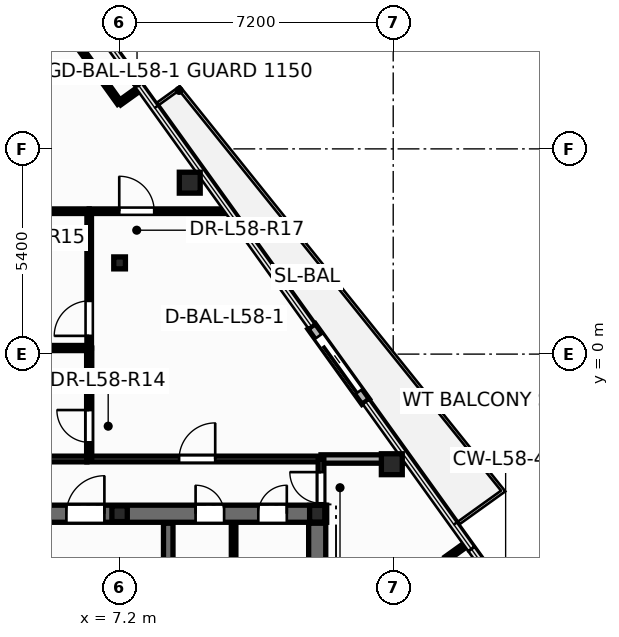
"""IFC4 building model, lengths in metres.
Left out: names, types, materials, properties, quantities, classifications, styles, units other than length and angle.
Written with IfcOpenShell. Run it as: python <this file> out.ifc"""

import sys

from ifc_helpers import new_model, si_unit, direction, frame, frame_2d, origin, origin_2d, place, context, subcontext, project, spatial, rectangle, hollow_circle, i_section, extrude, element, fill, save


model = new_model("IFC4")
c1 = context("Model", 3, precision=1e-05, world=origin(), true_north=direction((0.0, 1.0)))
c2 = subcontext(c1, "Body", "Model", "MODEL_VIEW")
j1 = project(units=[si_unit("LENGTHUNIT", "METRE"), si_unit("PLANEANGLEUNIT", "RADIAN")], contexts=[c1])
p1 = place(None, origin())
s1 = spatial("IfcSite", under=j1, at=p1, CompositionType="ELEMENT")
p2 = place(p1, origin())
s2 = spatial("IfcBuilding", under=s1, at=p2, CompositionType="ELEMENT")
p3 = place(p2, frame((0.0, 0.0, 221.7)))
s3 = spatial("IfcBuildingStorey", under=s2, at=p3, CompositionType="ELEMENT", Elevation=221.7)
for number, where, z_axis, x_axis in (
    (1, (14.363, -2.897, 0.0), (0.0, 0.0, 1.0), (1.0, 0.0, 0.0)),
    (2, (9.046, 4.51, 0.0), (0.0, 0.0, 1.0), (1.0, 0.0, 0.0)),
):
    element("IfcColumn", number, at=place(p3, frame(where, z_axis=z_axis, x_axis=x_axis)), inside=s3, PredefinedType="COLUMN", context=c2, shape_type="SweptSolid", body=[
        extrude(hollow_circle(Radius=0.275, WallThickness=0.024, at=origin_2d()), origin(), (0.0, 0.0, 1.0), 3.6),
    ])
p4 = place(p3, frame((12.4, -4.2, 0.0), z_axis=(0.0, 0.0, 1.0), x_axis=(1.0, 0.0, 0.0)))
e3 = element("IfcColumn", 3, at=p4, inside=s3, PredefinedType="COLUMN", context=c2, shape_type="SweptSolid", body=[
    extrude(i_section(OverallWidth=0.4, OverallDepth=0.44, WebThickness=0.028, FlangeThickness=0.04, at=origin_2d()), origin(), (0.0, 0.0, 1.0), 3.6),
])
p5 = place(p3, frame((7.2, -4.2, 0.0), z_axis=(0.0, 0.0, 1.0), x_axis=(1.0, 0.0, 0.0)))
e4 = element("IfcColumn", 4, at=p5, inside=s3, PredefinedType="PILASTER", context=c2, shape_type="SweptSolid", body=[
    extrude(i_section(OverallWidth=0.405, OverallDepth=0.414, WebThickness=0.022, FlangeThickness=0.032, at=origin_2d()), origin(), (0.0, 0.0, 1.0), 3.6),
])
p6 = place(p3, frame((7.2, 2.4, 0.0), z_axis=(0.0, 0.0, 1.0), x_axis=(1.0, 0.0, 0.0)))
e5 = element("IfcColumn", 5, at=p6, inside=s3, PredefinedType="COLUMN", context=c2, shape_type="SweptSolid", body=[
    extrude(i_section(OverallWidth=0.307, OverallDepth=0.314, WebThickness=0.012, FlangeThickness=0.019, at=origin_2d()), origin(), (0.0, 0.0, 1.0), 3.6),
])
p7 = place(p3, frame((13.675, -1.252, -0.015), z_axis=(0.0, 0.0, 1.0), x_axis=(-0.583139062732, 0.812372349059, 0.0)))
e6 = element("IfcWall", 6, at=p7, inside=s3, PredefinedType="STANDARD", context=c2, shape_type="SweptSolid", body=[
    extrude(rectangle(XDim=2.44, YDim=0.24, at=frame_2d((1.22, 0.0))), origin(), (0.0, 0.0, 1.0), 2.878),
])
p8 = place(p7, frame((0.32, 0.0, 0.015)))
e7 = element("IfcOpeningElement", 7, at=p8, cuts=e6, PredefinedType="OPENING", context=c2, shape_type="SweptSolid", body=[
    extrude(rectangle(XDim=1.806, YDim=2.204, at=frame_2d((0.9, 1.102))), frame((0.0, 0.13, 0.0), z_axis=(0.0, -1.0, 0.0), x_axis=(1.0, 0.0, 0.0)), (0.0, 0.0, 1.0), 0.26),
])
p9 = place(p3, frame((10.2, -5.52, 0.0), z_axis=(0.0, 0.0, 1.0), x_axis=(0.0, 1.0, 0.0)))
e8 = element("IfcWall", 8, at=p9, inside=s3, PredefinedType="PARTITIONING", context=c2, shape_type="SweptSolid", body=[
    extrude(rectangle(XDim=1.12, YDim=0.12, at=frame_2d((0.56, 0.0))), origin(), (0.0, 0.0, 1.0), 3.345),
])
p10 = place(p3, frame((-12.65, -4.2, 0.0), z_axis=(0.0, 0.0, 1.0), x_axis=(1.0, 0.0, 0.0)))
e9 = element("IfcWall", 9, at=p10, inside=s3, PredefinedType="SHEAR", context=c2, shape_type="SweptSolid", body=[
    extrude(rectangle(XDim=25.3, YDim=0.45, at=frame_2d((12.65, 0.0))), origin(), (0.0, 0.0, 1.0), 3.6),
])
p11 = place(p10, frame((1.85, 0.0, 0.0)))
e10 = element("IfcOpeningElement", 10, at=p11, cuts=e9, PredefinedType="OPENING", context=c2, shape_type="SweptSolid", body=[
    extrude(rectangle(XDim=0.756, YDim=2.054, at=frame_2d((0.375, 1.027))), frame((0.0, 0.235, 0.0), z_axis=(0.0, -1.0, 0.0), x_axis=(1.0, 0.0, 0.0)), (0.0, 0.0, 1.0), 0.47),
])
p12 = place(p10, frame((21.85, 0.0, 0.0)))
e11 = element("IfcOpeningElement", 11, at=p12, cuts=e9, PredefinedType="OPENING", context=c2, shape_type="SweptSolid", body=[
    extrude(rectangle(XDim=0.756, YDim=2.054, at=frame_2d((0.375, 1.027))), frame((0.0, 0.235, 0.0), z_axis=(0.0, -1.0, 0.0), x_axis=(1.0, 0.0, 0.0)), (0.0, 0.0, 1.0), 0.47),
])
p13 = place(p10, frame((23.5, 0.0, 0.0)))
e12 = element("IfcOpeningElement", 12, at=p13, cuts=e9, PredefinedType="OPENING", context=c2, shape_type="SweptSolid", body=[
    extrude(rectangle(XDim=0.756, YDim=2.054, at=frame_2d((0.375, 1.027))), frame((0.0, 0.235, 0.0), z_axis=(0.0, -1.0, 0.0), x_axis=(1.0, 0.0, 0.0)), (0.0, 0.0, 1.0), 0.47),
])
p14 = place(p10, frame((5.85, 0.0, 0.0)))
e13 = element("IfcOpeningElement", 13, at=p14, cuts=e9, PredefinedType="OPENING", context=c2, shape_type="SweptSolid", body=[
    extrude(rectangle(XDim=1.006, YDim=2.104, at=frame_2d((0.5, 1.052))), frame((0.0, 0.235, 0.0), z_axis=(0.0, -1.0, 0.0), x_axis=(1.0, 0.0, 0.0)), (0.0, 0.0, 1.0), 0.47),
])
p15 = place(p10, frame((10.35, 0.0, 0.0)))
e14 = element("IfcOpeningElement", 14, at=p15, cuts=e9, PredefinedType="OPENING", context=c2, shape_type="SweptSolid", body=[
    extrude(rectangle(XDim=1.406, YDim=2.154, at=frame_2d((0.7, 1.077))), frame((0.0, 0.235, 0.0), z_axis=(0.0, -1.0, 0.0), x_axis=(1.0, 0.0, 0.0)), (0.0, 0.0, 1.0), 0.47),
])
p16 = place(p10, frame((18.45, 0.0, 0.0)))
e15 = element("IfcOpeningElement", 15, at=p16, cuts=e9, PredefinedType="OPENING", context=c2, shape_type="SweptSolid", body=[
    extrude(rectangle(XDim=1.006, YDim=2.104, at=frame_2d((0.5, 1.052))), frame((0.0, 0.235, 0.0), z_axis=(0.0, -1.0, 0.0), x_axis=(1.0, 0.0, 0.0)), (0.0, 0.0, 1.0), 0.47),
])
p17 = place(p3, frame((8.48, -13.85, 0.0), z_axis=(0.0, 0.0, 1.0), x_axis=(0.0, 1.0, 0.0)))
e16 = element("IfcWall", 16, at=p17, inside=s3, PredefinedType="SHEAR", context=c2, shape_type="SweptSolid", body=[
    extrude(rectangle(XDim=9.4, YDim=0.25, at=frame_2d((4.7, 0.0))), origin(), (0.0, 0.0, 1.0), 3.6),
])
p18 = place(p17, frame((6.95, 0.0, 0.0)))
e17 = element("IfcOpeningElement", 17, at=p18, cuts=e16, PredefinedType="OPENING", context=c2, shape_type="SweptSolid", body=[
    extrude(rectangle(XDim=1.006, YDim=2.104, at=frame_2d((0.5, 1.052))), frame((0.0, 0.135, 0.0), z_axis=(0.0, -1.0, 0.0), x_axis=(1.0, 0.0, 0.0)), (0.0, 0.0, 1.0), 0.27),
])
p19 = place(p3, frame((12.4, -13.85, 0.0), z_axis=(0.0, 0.0, 1.0), x_axis=(0.0, 1.0, 0.0)))
e18 = element("IfcWall", 18, at=p19, inside=s3, PredefinedType="SHEAR", context=c2, shape_type="SweptSolid", body=[
    extrude(rectangle(XDim=9.4, YDim=0.45, at=frame_2d((4.7, 0.0))), origin(), (0.0, 0.0, 1.0), 3.6),
])
p20 = place(p3, frame((6.34, -2.76, 0.0), z_axis=(0.0, 0.0, 1.0), x_axis=(1.0, 0.0, 0.0)))
e19 = element("IfcWall", 19, at=p20, inside=s3, PredefinedType="PARTITIONING", context=c2, shape_type="SweptSolid", body=[
    extrude(rectangle(XDim=6.16, YDim=0.15, at=frame_2d((3.08, 0.0))), origin(), (0.0, 0.0, 1.0), 2.32),
])
p21 = place(p20, frame((2.426, 0.0, 0.0)))
e20 = element("IfcOpeningElement", 20, at=p21, cuts=e19, PredefinedType="OPENING", context=c2, shape_type="SweptSolid", body=[
    extrude(rectangle(XDim=0.956, YDim=2.104, at=frame_2d((0.475, 1.052))), frame((0.0, 0.085, 0.0), z_axis=(0.0, -1.0, 0.0), x_axis=(1.0, 0.0, 0.0)), (0.0, 0.0, 1.0), 0.17),
])
p22 = place(p3, frame((6.4, 3.76, 0.0), z_axis=(0.0, 0.0, 1.0), x_axis=(1.0, 0.0, 0.0)))
e21 = element("IfcWall", 21, at=p22, inside=s3, PredefinedType="PARTITIONING", context=c2, shape_type="SweptSolid", body=[
    extrude(rectangle(XDim=3.677, YDim=0.12, at=frame_2d((1.839, 0.0))), origin(), (0.0, 0.0, 1.0), 2.62),
])
p23 = place(p22, frame((0.791, 0.0, 0.0)))
e22 = element("IfcOpeningElement", 22, at=p23, cuts=e21, PredefinedType="OPENING", context=c2, shape_type="SweptSolid", body=[
    extrude(rectangle(XDim=0.926, YDim=2.104, at=frame_2d((0.46, 1.052))), frame((0.0, 0.07, 0.0), z_axis=(0.0, -1.0, 0.0), x_axis=(1.0, 0.0, 0.0)), (0.0, 0.0, 1.0), 0.14),
])
p24 = place(p3, frame((-0.5, 3.76, 0.0), z_axis=(0.0, 0.0, 1.0), x_axis=(1.0, 0.0, 0.0)))
e23 = element("IfcWall", 23, at=p24, inside=s3, PredefinedType="PARTITIONING", context=c2, shape_type="SweptSolid", body=[
    extrude(rectangle(XDim=6.9, YDim=0.12, at=frame_2d((3.45, 0.0))), origin(), (0.0, 0.0, 1.0), 2.32),
])
p25 = place(p3, frame((6.4, 0.16, 0.0), z_axis=(0.0, 0.0, 1.0), x_axis=(0.0, 1.0, 0.0)))
e24 = element("IfcWall", 24, at=p25, inside=s3, PredefinedType="PARTITIONING", context=c2, shape_type="SweptSolid", body=[
    extrude(rectangle(XDim=3.6, YDim=0.12, at=frame_2d((1.8, 0.0))), origin(), (0.0, 0.0, 1.0), 2.32),
])
p26 = place(p25, frame((0.32, 0.0, 0.0)))
e25 = element("IfcOpeningElement", 25, at=p26, cuts=e24, PredefinedType="OPENING", context=c2, shape_type="SweptSolid", body=[
    extrude(rectangle(XDim=0.926, YDim=2.104, at=frame_2d((0.46, 1.052))), frame((0.0, 0.07, 0.0), z_axis=(0.0, -1.0, 0.0), x_axis=(1.0, 0.0, 0.0)), (0.0, 0.0, 1.0), 0.14),
])
p27 = place(p3, frame((6.4, -2.76, 0.0), z_axis=(0.0, 0.0, 1.0), x_axis=(0.0, 1.0, 0.0)))
e26 = element("IfcWall", 26, at=p27, inside=s3, PredefinedType="PARTITIONING", context=c2, shape_type="SweptSolid", body=[
    extrude(rectangle(XDim=2.92, YDim=0.135, at=frame_2d((1.46, 0.0))), origin(), (0.0, 0.0, 1.0), 3.345),
])
p28 = place(p27, frame((0.438, 0.0, 0.0)))
e27 = element("IfcOpeningElement", 27, at=p28, cuts=e26, PredefinedType="OPENING", context=c2, shape_type="SweptSolid", body=[
    extrude(rectangle(XDim=0.856, YDim=2.104, at=frame_2d((0.425, 1.052))), frame((0.0, 0.078, 0.0), z_axis=(0.0, -1.0, 0.0), x_axis=(1.0, 0.0, 0.0)), (0.0, 0.0, 1.0), 0.155),
])
p29 = place(p3, frame((3.862, -2.76, 0.0), z_axis=(0.0, 0.0, 1.0), x_axis=(1.0, 0.0, 0.0)))
e28 = element("IfcWall", 28, at=p29, inside=s3, PredefinedType="PARTITIONING", context=c2, shape_type="SweptSolid", body=[
    extrude(rectangle(XDim=2.476, YDim=0.15, at=frame_2d((1.238, 0.0))), origin(), (0.0, 0.0, 1.0), 3.345),
])
p30 = place(p3, frame((3.8, 0.16, 0.0), z_axis=(0.0, 0.0, 1.0), x_axis=(1.0, 0.0, 0.0)))
e29 = element("IfcWall", 29, at=p30, inside=s3, PredefinedType="PARTITIONING", context=c2, shape_type="SweptSolid", body=[
    extrude(rectangle(XDim=2.6, YDim=0.135, at=frame_2d((1.3, 0.0))), origin(), (0.0, 0.0, 1.0), 3.345),
])
p31 = place(p3, frame((7.197, 6.607, 0.0), z_axis=(0.0, 0.0, 1.0), x_axis=(-0.583135111371, 0.81237518542, 0.0)))
e30 = element("IfcWall", 30, at=p31, inside=s3, PredefinedType="PARTITIONING", context=c2, shape_type="SweptSolid", body=[
    extrude(rectangle(XDim=2.421, YDim=0.12, at=frame_2d((1.21, 0.0))), origin(), (0.0, 0.0, 1.0), 3.345),
])
p32 = place(p3, frame((12.5, -2.76, 0.0), z_axis=(0.0, 0.0, 1.0), x_axis=(1.0, 0.0, 0.0)))
e31 = element("IfcWall", 31, at=p32, inside=s3, PredefinedType="PARTITIONING", context=c2, shape_type="SweptSolid", body=[
    extrude(rectangle(XDim=2.257, YDim=0.22, at=frame_2d((1.129, 0.0))), origin(), (0.0, 0.0, 1.0), 2.62),
])
p33 = place(p3, frame((17.213, -7.347, 0.0), z_axis=(0.0, 0.0, 1.0), x_axis=(-0.583201664134, 0.812327408716, 0.0)))
e32 = element("IfcWall", 32, at=p33, inside=s3, PredefinedType="PARTITIONING", context=c2, shape_type="SweptSolid", body=[
    extrude(rectangle(XDim=2.421, YDim=0.12, at=frame_2d((1.21, 0.0))), origin(), (0.0, 0.0, 1.0), 3.345),
])
p34 = place(p3, frame((12.5, -4.24, 0.0), z_axis=(0.0, 0.0, 1.0), x_axis=(0.0, 1.0, 0.0)))
e33 = element("IfcWall", 33, at=p34, inside=s3, PredefinedType="PARTITIONING", context=c2, shape_type="SweptSolid", body=[
    extrude(rectangle(XDim=1.48, YDim=0.15, at=frame_2d((0.74, 0.0))), origin(), (0.0, 0.0, 1.0), 2.32),
])
p35 = place(p34, frame((0.315, 0.0, 0.0)))
e34 = element("IfcOpeningElement", 34, at=p35, cuts=e33, PredefinedType="OPENING", context=c2, shape_type="SweptSolid", body=[
    extrude(rectangle(XDim=0.826, YDim=2.104, at=frame_2d((0.41, 1.052))), frame((0.0, 0.085, 0.0), z_axis=(0.0, -1.0, 0.0), x_axis=(1.0, 0.0, 0.0)), (0.0, 0.0, 1.0), 0.17),
])
p36 = place(p3, frame((15.801, -5.38, 0.0), z_axis=(0.0, 0.0, 1.0), x_axis=(0.812328158573, 0.583200619675, 0.0)))
e35 = element("IfcWall", 35, at=p36, inside=s3, PredefinedType="PARTITIONING", context=c2, shape_type="SweptSolid", body=[
    extrude(rectangle(XDim=0.67, YDim=0.12, at=frame_2d((0.335, 0.0))), origin(), (0.0, 0.0, 1.0), 2.863),
])
p37 = place(p3, frame((7.741, 6.998, 0.0), z_axis=(0.0, 0.0, 1.0), x_axis=(-0.812549510699, -0.582892179277, 0.0)))
e36 = element("IfcWall", 36, at=p37, inside=s3, PredefinedType="PARTITIONING", context=c2, shape_type="SweptSolid", body=[
    extrude(rectangle(XDim=0.67, YDim=0.12, at=frame_2d((0.335, 0.0))), origin(), (0.0, 0.0, 1.0), 2.863),
])
p38 = place(p8, origin())
e37 = element("IfcDoor", 37, at=p38, inside=s3, OperationType="SLIDING_TO_LEFT", PredefinedType="DOOR", context=c2, shape_type="SweptSolid", body=[
    extrude(rectangle(XDim=1.8, YDim=2.2, at=frame_2d((0.9, 1.1))), frame((0.0, 0.025, 0.0), z_axis=(0.0, -1.0, 0.0), x_axis=(1.0, 0.0, 0.0)), (0.0, 0.0, 1.0), 0.05),
])
fill(e7, e37)
p39 = place(p12, origin())
e38 = element("IfcDoor", 38, at=p39, inside=s3, OperationType="SINGLE_SWING_LEFT", PredefinedType="DOOR", context=c2, shape_type="SweptSolid", body=[
    extrude(rectangle(XDim=0.75, YDim=2.05, at=frame_2d((0.375, 1.025))), frame((0.0, 0.025, 0.0), z_axis=(0.0, -1.0, 0.0), x_axis=(1.0, 0.0, 0.0)), (0.0, 0.0, 1.0), 0.05),
])
fill(e11, e38)
p40 = place(p13, origin())
e39 = element("IfcDoor", 39, at=p40, inside=s3, OperationType="SINGLE_SWING_RIGHT", PredefinedType="DOOR", context=c2, shape_type="SweptSolid", body=[
    extrude(rectangle(XDim=0.75, YDim=2.05, at=frame_2d((0.375, 1.025))), frame((0.0, 0.025, 0.0), z_axis=(0.0, -1.0, 0.0), x_axis=(1.0, 0.0, 0.0)), (0.0, 0.0, 1.0), 0.05),
])
fill(e12, e39)
p41 = place(p16, origin())
e40 = element("IfcDoor", 40, at=p41, inside=s3, OperationType="SINGLE_SWING_RIGHT", PredefinedType="DOOR", context=c2, shape_type="SweptSolid", body=[
    extrude(rectangle(XDim=1.0, YDim=2.1, at=frame_2d((0.5, 1.05))), frame((0.0, 0.025, 0.0), z_axis=(0.0, -1.0, 0.0), x_axis=(1.0, 0.0, 0.0)), (0.0, 0.0, 1.0), 0.05),
])
fill(e15, e40)
p42 = place(p35, origin())
e41 = element("IfcDoor", 41, at=p42, inside=s3, OperationType="SINGLE_SWING_RIGHT", PredefinedType="DOOR", context=c2, shape_type="SweptSolid", body=[
    extrude(rectangle(XDim=0.82, YDim=2.1, at=frame_2d((0.41, 1.05))), frame((0.0, 0.025, 0.0), z_axis=(0.0, -1.0, 0.0), x_axis=(1.0, 0.0, 0.0)), (0.0, 0.0, 1.0), 0.05),
])
fill(e34, e41)
p43 = place(p28, origin())
e42 = element("IfcDoor", 42, at=p43, inside=s3, OperationType="SINGLE_SWING_RIGHT", PredefinedType="DOOR", context=c2, shape_type="SweptSolid", body=[
    extrude(rectangle(XDim=0.85, YDim=2.1, at=frame_2d((0.425, 1.05))), frame((0.0, 0.025, 0.0), z_axis=(0.0, -1.0, 0.0), x_axis=(1.0, 0.0, 0.0)), (0.0, 0.0, 1.0), 0.05),
])
fill(e27, e42)
p44 = place(p26, origin())
e43 = element("IfcDoor", 43, at=p44, inside=s3, OperationType="SINGLE_SWING_LEFT", PredefinedType="DOOR", context=c2, shape_type="SweptSolid", body=[
    extrude(rectangle(XDim=0.92, YDim=2.1, at=frame_2d((0.46, 1.05))), frame((0.0, 0.025, 0.0), z_axis=(0.0, -1.0, 0.0), x_axis=(1.0, 0.0, 0.0)), (0.0, 0.0, 1.0), 0.05),
])
fill(e25, e43)
p45 = place(p21, origin())
e44 = element("IfcDoor", 44, at=p45, inside=s3, OperationType="SINGLE_SWING_RIGHT", PredefinedType="DOOR", context=c2, shape_type="SweptSolid", body=[
    extrude(rectangle(XDim=0.95, YDim=2.1, at=frame_2d((0.475, 1.05))), frame((0.0, 0.025, 0.0), z_axis=(0.0, -1.0, 0.0), x_axis=(1.0, 0.0, 0.0)), (0.0, 0.0, 1.0), 0.05),
])
fill(e20, e44)
p46 = place(p23, origin())
e45 = element("IfcDoor", 45, at=p46, inside=s3, OperationType="SINGLE_SWING_LEFT", PredefinedType="DOOR", context=c2, shape_type="SweptSolid", body=[
    extrude(rectangle(XDim=0.92, YDim=2.1, at=frame_2d((0.46, 1.05))), frame((0.0, 0.025, 0.0), z_axis=(0.0, -1.0, 0.0), x_axis=(1.0, 0.0, 0.0)), (0.0, 0.0, 1.0), 0.05),
])
fill(e22, e45)
save(model, sys.argv[1])
